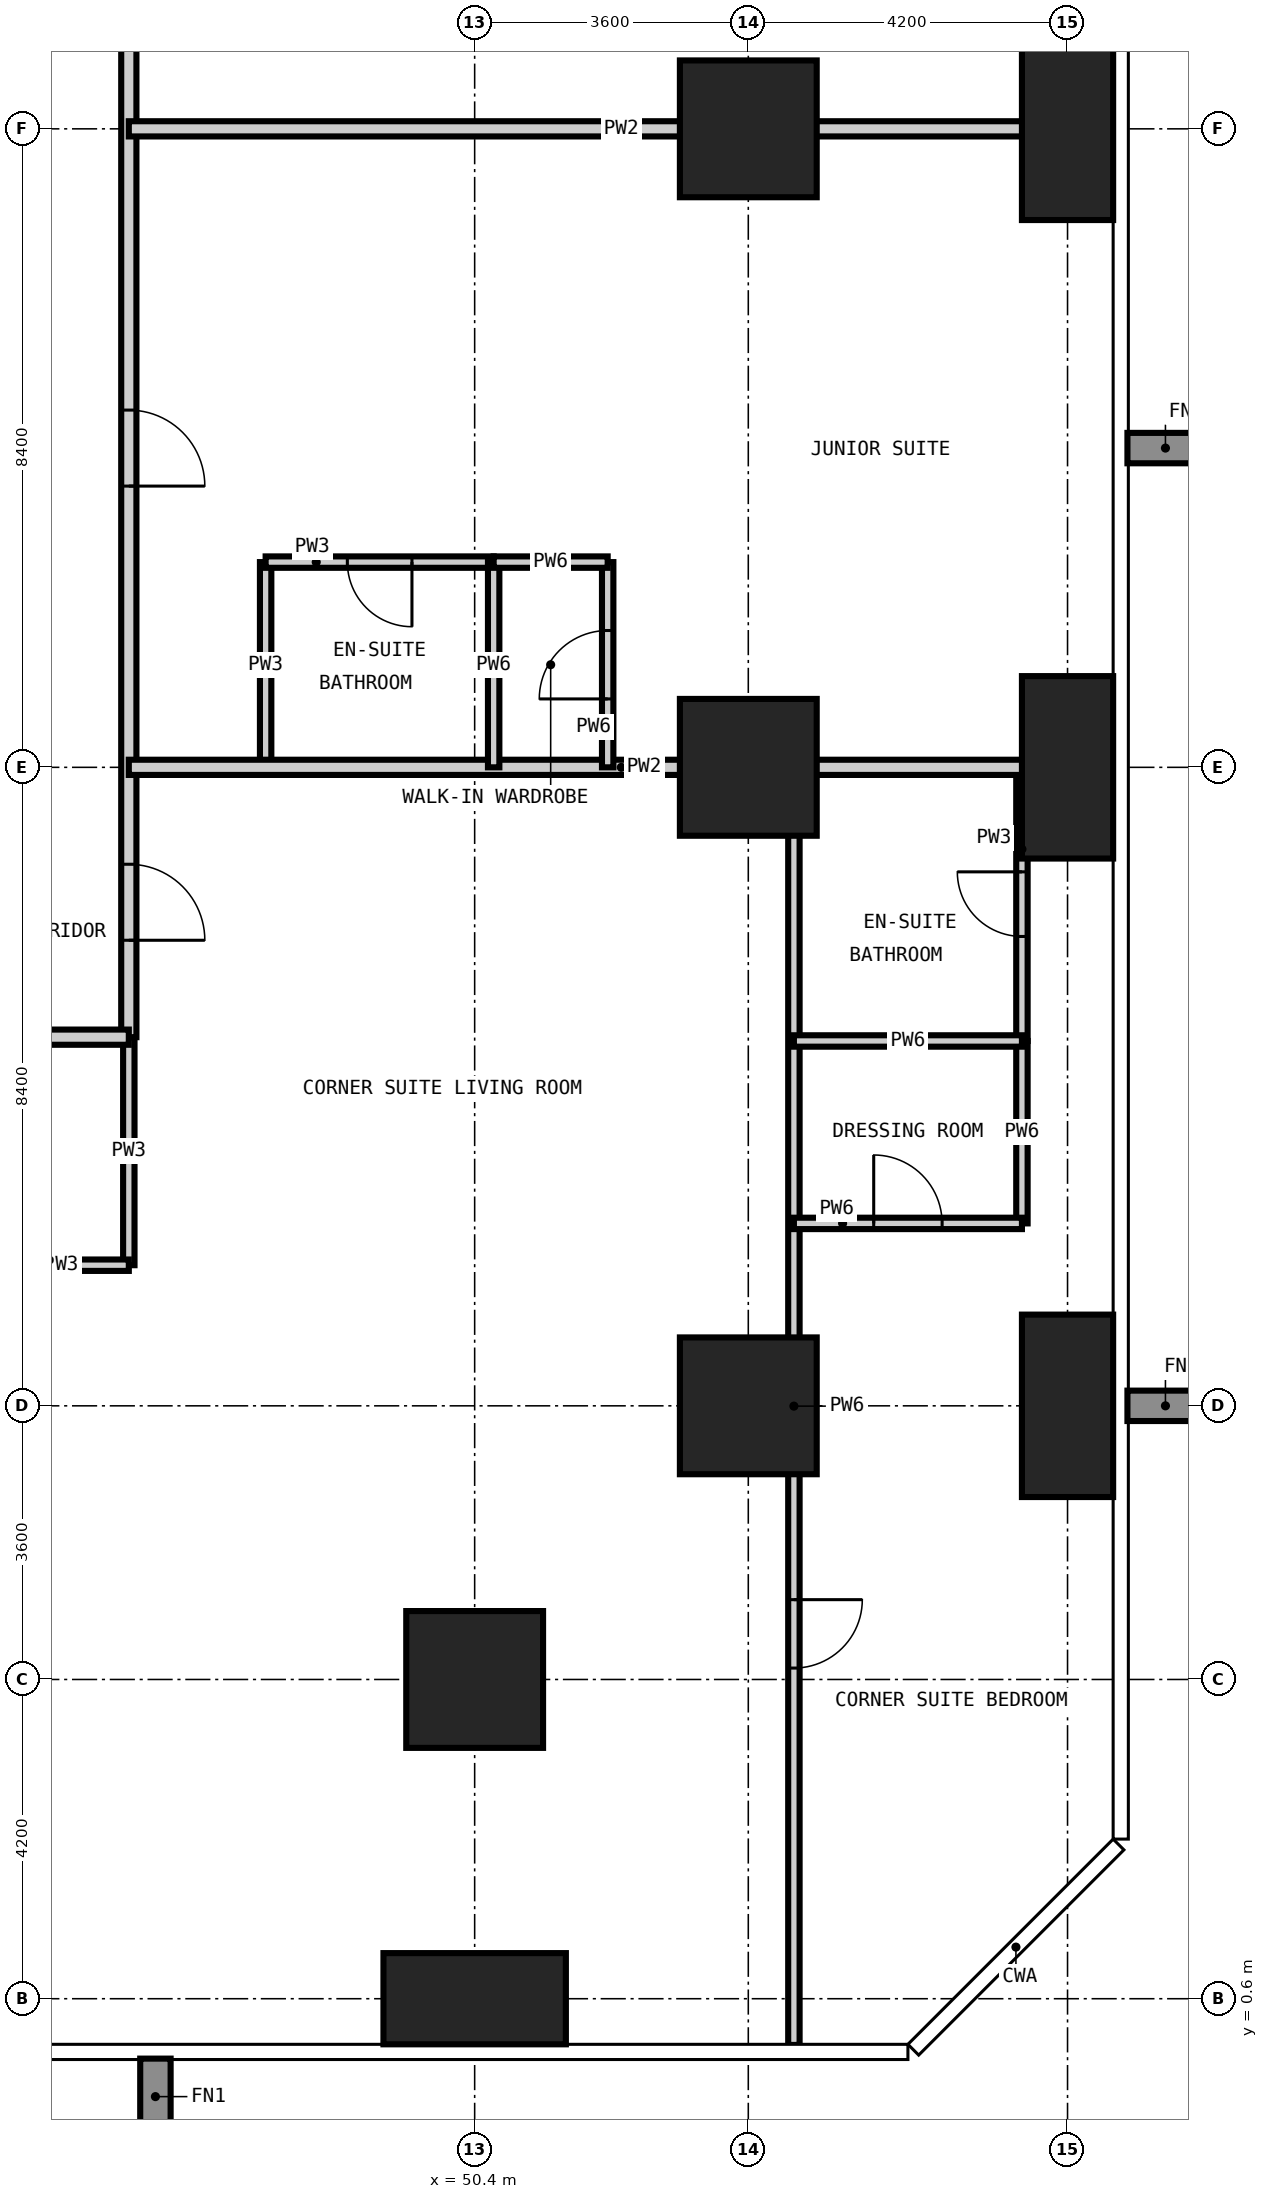
"""IFC4 building model, lengths in metres.
Left out: names, types, materials, properties, quantities, classifications, styles, units other than length and angle.
Written with IfcOpenShell. Run it as: python <this file> out.ifc"""

import sys

from ifc_helpers import new_model, si_unit, direction, frame, frame_2d, origin, origin_2d, place, context, subcontext, project, spatial, rectangle, extrude, element, fill, save


model = new_model("IFC4")
c1 = context("Model", 3, precision=1e-05, world=origin(), true_north=direction((0.0, 1.0)))
c2 = subcontext(c1, "Body", "Model", "MODEL_VIEW")
j1 = project(units=[si_unit("LENGTHUNIT", "METRE"), si_unit("PLANEANGLEUNIT", "RADIAN")], contexts=[c1])
p1 = place(None, origin())
s1 = spatial("IfcSite", under=j1, at=p1, CompositionType="ELEMENT")
p2 = place(p1, origin())
s2 = spatial("IfcBuilding", under=s1, at=p2, CompositionType="ELEMENT")
p3 = place(p2, frame((0.0, 0.0, 34.2)))
s3 = spatial("IfcBuildingStorey", under=s2, at=p3, CompositionType="ELEMENT", Elevation=34.2)
p4 = place(p3, frame((50.4, 0.6, -0.35), z_axis=(0.0, 0.0, 1.0), x_axis=(1.0, 0.0, 0.0)))
e1 = element("IfcColumn", 1, at=p4, inside=s3, PredefinedType="COLUMN", context=c2, shape_type="SweptSolid", body=[
    extrude(rectangle(XDim=2.4, YDim=1.2, at=origin_2d()), origin(), (0.0, 0.0, 1.0), 3.6),
])
for number, where, z_axis, x_axis in (
    (2, (50.4, 4.8, -0.35), (0.0, 0.0, 1.0), (1.0, 0.0, 0.0)),
    (3, (54.0, 8.4, -0.35), (0.0, 0.0, 1.0), (1.0, 0.0, 0.0)),
    (4, (54.0, 16.8, -0.35), (0.0, 0.0, 1.0), (1.0, 0.0, 0.0)),
    (5, (54.0, 25.2, -0.35), (0.0, 0.0, 1.0), (1.0, 0.0, 0.0)),
):
    element("IfcColumn", number, at=place(p3, frame(where, z_axis=z_axis, x_axis=x_axis)), inside=s3, PredefinedType="COLUMN", context=c2, shape_type="SweptSolid", body=[
        extrude(rectangle(XDim=1.8, YDim=1.8, at=origin_2d()), origin(), (0.0, 0.0, 1.0), 3.6),
    ])
for number, where, z_axis, x_axis in (
    (6, (58.2, 8.4, -0.35), (0.0, 0.0, 1.0), (1.0, 0.0, 0.0)),
    (7, (58.2, 16.8, -0.35), (0.0, 0.0, 1.0), (1.0, 0.0, 0.0)),
    (8, (58.2, 25.2, -0.35), (0.0, 0.0, 1.0), (1.0, 0.0, 0.0)),
):
    element("IfcColumn", number, at=place(p3, frame(where, z_axis=z_axis, x_axis=x_axis)), inside=s3, PredefinedType="COLUMN", context=c2, shape_type="SweptSolid", body=[
        extrude(rectangle(XDim=1.2, YDim=2.4, at=origin_2d()), origin(), (0.0, 0.0, 1.0), 3.6),
    ])
p5 = place(p3, frame((45.85, 10.25, 0.0), z_axis=(0.0, 0.0, 1.0), x_axis=(0.0, 1.0, 0.0)))
e9 = element("IfcWall", 9, at=p5, inside=s3, PredefinedType="PARTITIONING", context=c2, shape_type="SweptSolid", body=[
    extrude(rectangle(XDim=3.0, YDim=0.15, at=frame_2d((1.5, 0.0))), origin(), (0.0, 0.0, 1.0), 3.25),
])
p6 = place(p3, frame((47.65, 16.8, 0.0), z_axis=(0.0, 0.0, 1.0), x_axis=(0.0, 1.0, 0.0)))
e10 = element("IfcWall", 10, at=p6, inside=s3, PredefinedType="PARTITIONING", context=c2, shape_type="SweptSolid", body=[
    extrude(rectangle(XDim=2.7, YDim=0.15, at=frame_2d((1.35, 0.0))), origin(), (0.0, 0.0, 1.0), 3.25),
])
p7 = place(p3, frame((57.6, 13.2, 0.0), z_axis=(0.0, 0.0, 1.0), x_axis=(0.0, 1.0, 0.0)))
e11 = element("IfcWall", 11, at=p7, inside=s3, PredefinedType="PARTITIONING", context=c2, shape_type="SweptSolid", body=[
    extrude(rectangle(XDim=3.6, YDim=0.15, at=frame_2d((1.8, 0.0))), origin(), (0.0, 0.0, 1.0), 3.25),
])
p8 = place(p7, frame((1.375, 0.0, 0.0)))
e12 = element("IfcOpeningElement", 12, at=p8, cuts=e11, PredefinedType="OPENING", context=c2, shape_type="SweptSolid", body=[
    extrude(rectangle(XDim=0.85, YDim=2.1, at=frame_2d((0.425, 1.05))), frame((0.0, 0.085, 0.0), z_axis=(0.0, -1.0, 0.0), x_axis=(1.0, 0.0, 0.0)), (0.0, 0.0, 1.0), 0.17),
])
p9 = place(p3, frame((42.0, 10.25, 0.0), z_axis=(0.0, 0.0, 1.0), x_axis=(1.0, 0.0, 0.0)))
e13 = element("IfcWall", 13, at=p9, inside=s3, PredefinedType="PARTITIONING", context=c2, shape_type="SweptSolid", body=[
    extrude(rectangle(XDim=3.85, YDim=0.15, at=frame_2d((1.925, 0.0))), origin(), (0.0, 0.0, 1.0), 3.25),
])
p10 = place(p9, frame((1.5, 0.0, 0.0)))
e14 = element("IfcOpeningElement", 14, at=p10, cuts=e13, PredefinedType="OPENING", context=c2, shape_type="SweptSolid", body=[
    extrude(rectangle(XDim=0.85, YDim=2.1, at=frame_2d((0.425, 1.05))), frame((0.0, 0.085, 0.0), z_axis=(0.0, -1.0, 0.0), x_axis=(1.0, 0.0, 0.0)), (0.0, 0.0, 1.0), 0.17),
])
p11 = place(p3, frame((47.65, 19.5, 0.0), z_axis=(0.0, 0.0, 1.0), x_axis=(1.0, 0.0, 0.0)))
e15 = element("IfcWall", 15, at=p11, inside=s3, PredefinedType="PARTITIONING", context=c2, shape_type="SweptSolid", body=[
    extrude(rectangle(XDim=3.0, YDim=0.15, at=frame_2d((1.5, 0.0))), origin(), (0.0, 0.0, 1.0), 3.25),
])
p12 = place(p11, frame((1.075, 0.0, 0.0)))
e16 = element("IfcOpeningElement", 16, at=p12, cuts=e15, PredefinedType="OPENING", context=c2, shape_type="SweptSolid", body=[
    extrude(rectangle(XDim=0.85, YDim=2.1, at=frame_2d((0.425, 1.05))), frame((0.0, 0.085, 0.0), z_axis=(0.0, -1.0, 0.0), x_axis=(1.0, 0.0, 0.0)), (0.0, 0.0, 1.0), 0.17),
])
p13 = place(p3, frame((45.85, 45.25, 0.0), z_axis=(0.0, 0.0, 1.0), x_axis=(0.0, -1.0, 0.0)))
e17 = element("IfcWall", 17, at=p13, inside=s3, PredefinedType="PARTITIONING", context=c2, shape_type="SweptSolid", body=[
    extrude(rectangle(XDim=32.0, YDim=0.2, at=frame_2d((16.0, 0.0))), origin(), (0.0, 0.0, 1.0), 3.25),
])
p14 = place(p13, frame((23.75, 0.0, 0.0)))
e18 = element("IfcOpeningElement", 18, at=p14, cuts=e17, PredefinedType="OPENING", context=c2, shape_type="SweptSolid", body=[
    extrude(rectangle(XDim=1.0, YDim=2.2, at=frame_2d((0.5, 1.1))), frame((0.0, 0.11, 0.0), z_axis=(0.0, -1.0, 0.0), x_axis=(1.0, 0.0, 0.0)), (0.0, 0.0, 1.0), 0.22),
])
p15 = place(p13, frame((15.35, 0.0, 0.0)))
e19 = element("IfcOpeningElement", 19, at=p15, cuts=e17, PredefinedType="OPENING", context=c2, shape_type="SweptSolid", body=[
    extrude(rectangle(XDim=1.0, YDim=2.2, at=frame_2d((0.5, 1.1))), frame((0.0, 0.11, 0.0), z_axis=(0.0, -1.0, 0.0), x_axis=(1.0, 0.0, 0.0)), (0.0, 0.0, 1.0), 0.22),
])
p16 = place(p13, frame((6.95, 0.0, 0.0)))
e20 = element("IfcOpeningElement", 20, at=p16, cuts=e17, PredefinedType="OPENING", context=c2, shape_type="SweptSolid", body=[
    extrude(rectangle(XDim=1.0, YDim=2.2, at=frame_2d((0.5, 1.1))), frame((0.0, 0.11, 0.0), z_axis=(0.0, -1.0, 0.0), x_axis=(1.0, 0.0, 0.0)), (0.0, 0.0, 1.0), 0.22),
])
p17 = place(p13, frame((29.725, 0.0, 0.0)))
e21 = element("IfcOpeningElement", 21, at=p17, cuts=e17, PredefinedType="OPENING", context=c2, shape_type="SweptSolid", body=[
    extrude(rectangle(XDim=1.0, YDim=2.2, at=frame_2d((0.5, 1.1))), frame((0.0, 0.11, 0.0), z_axis=(0.0, -1.0, 0.0), x_axis=(1.0, 0.0, 0.0)), (0.0, 0.0, 1.0), 0.22),
])
p18 = place(p13, frame((1.125, 0.0, 0.0)))
e22 = element("IfcOpeningElement", 22, at=p18, cuts=e17, PredefinedType="OPENING", context=c2, shape_type="SweptSolid", body=[
    extrude(rectangle(XDim=1.0, YDim=2.2, at=frame_2d((0.5, 1.1))), frame((0.0, 0.11, 0.0), z_axis=(0.0, -1.0, 0.0), x_axis=(1.0, 0.0, 0.0)), (0.0, 0.0, 1.0), 0.22),
])
p19 = place(p3, frame((45.85, 13.25, 0.0), z_axis=(0.0, 0.0, 1.0), x_axis=(-1.0, 0.0, 0.0)))
e23 = element("IfcWall", 23, at=p19, inside=s3, PredefinedType="PARTITIONING", context=c2, shape_type="SweptSolid", body=[
    extrude(rectangle(XDim=32.6, YDim=0.2, at=frame_2d((16.3, 0.0))), origin(), (0.0, 0.0, 1.0), 3.25),
])
p20 = place(p19, frame((25.1, 0.0, 0.0)))
e24 = element("IfcOpeningElement", 24, at=p20, cuts=e23, PredefinedType="OPENING", context=c2, shape_type="SweptSolid", body=[
    extrude(rectangle(XDim=1.0, YDim=2.2, at=frame_2d((0.5, 1.1))), frame((0.0, 0.11, 0.0), z_axis=(0.0, -1.0, 0.0), x_axis=(1.0, 0.0, 0.0)), (0.0, 0.0, 1.0), 0.22),
])
p21 = place(p19, frame((21.65, 0.0, 0.0)))
e25 = element("IfcOpeningElement", 25, at=p21, cuts=e23, PredefinedType="OPENING", context=c2, shape_type="SweptSolid", body=[
    extrude(rectangle(XDim=1.0, YDim=2.2, at=frame_2d((0.5, 1.1))), frame((0.0, 0.11, 0.0), z_axis=(0.0, -1.0, 0.0), x_axis=(1.0, 0.0, 0.0)), (0.0, 0.0, 1.0), 0.22),
])
p22 = place(p19, frame((11.75, 0.0, 0.0)))
e26 = element("IfcOpeningElement", 26, at=p22, cuts=e23, PredefinedType="OPENING", context=c2, shape_type="SweptSolid", body=[
    extrude(rectangle(XDim=1.0, YDim=2.2, at=frame_2d((0.5, 1.1))), frame((0.0, 0.11, 0.0), z_axis=(0.0, -1.0, 0.0), x_axis=(1.0, 0.0, 0.0)), (0.0, 0.0, 1.0), 0.22),
])
p23 = place(p19, frame((6.8, 0.0, 0.0)))
e27 = element("IfcOpeningElement", 27, at=p23, cuts=e23, PredefinedType="OPENING", context=c2, shape_type="SweptSolid", body=[
    extrude(rectangle(XDim=1.0, YDim=2.2, at=frame_2d((0.5, 1.1))), frame((0.0, 0.11, 0.0), z_axis=(0.0, -1.0, 0.0), x_axis=(1.0, 0.0, 0.0)), (0.0, 0.0, 1.0), 0.22),
])
for number, where, z_axis, x_axis in (
    (28, (45.85, 16.8, 0.0), (0.0, 0.0, 1.0), (1.0, 0.0, 0.0)),
    (29, (45.85, 25.2, 0.0), (0.0, 0.0, 1.0), (1.0, 0.0, 0.0)),
):
    element("IfcWall", number, at=place(p3, frame(where, z_axis=z_axis, x_axis=x_axis)), inside=s3, PredefinedType="PARTITIONING", context=c2, shape_type="SweptSolid", body=[
        extrude(rectangle(XDim=12.958, YDim=0.2, at=frame_2d((6.479, 0.0))), origin(), (0.0, 0.0, 1.0), 3.25),
    ])
p24 = place(p3, frame((50.65, 16.8, 0.0), z_axis=(0.0, 0.0, 1.0), x_axis=(0.0, 1.0, 0.0)))
e30 = element("IfcWall", 30, at=p24, inside=s3, PredefinedType="PARTITIONING", context=c2, shape_type="SweptSolid", body=[
    extrude(rectangle(XDim=2.7, YDim=0.15, at=frame_2d((1.35, 0.0))), origin(), (0.0, 0.0, 1.0), 3.25),
])
p25 = place(p3, frame((52.15, 16.8, 0.0), z_axis=(0.0, 0.0, 1.0), x_axis=(0.0, 1.0, 0.0)))
e31 = element("IfcWall", 31, at=p25, inside=s3, PredefinedType="PARTITIONING", context=c2, shape_type="SweptSolid", body=[
    extrude(rectangle(XDim=2.7, YDim=0.15, at=frame_2d((1.35, 0.0))), origin(), (0.0, 0.0, 1.0), 3.25),
])
p26 = place(p25, frame((0.9, 0.0, 0.0)))
e32 = element("IfcOpeningElement", 32, at=p26, cuts=e31, PredefinedType="OPENING", context=c2, shape_type="SweptSolid", body=[
    extrude(rectangle(XDim=0.9, YDim=2.1, at=frame_2d((0.45, 1.05))), frame((0.0, 0.085, 0.0), z_axis=(0.0, -1.0, 0.0), x_axis=(1.0, 0.0, 0.0)), (0.0, 0.0, 1.0), 0.17),
])
p27 = place(p3, frame((54.6, -0.008, 0.0), z_axis=(0.0, 0.0, 1.0), x_axis=(0.0, 1.0, 0.0)))
e33 = element("IfcWall", 33, at=p27, inside=s3, PredefinedType="PARTITIONING", context=c2, shape_type="SweptSolid", body=[
    extrude(rectangle(XDim=16.808, YDim=0.15, at=frame_2d((8.404, 0.0))), origin(), (0.0, 0.0, 1.0), 3.25),
])
p28 = place(p27, frame((4.958, 0.0, 0.0)))
e34 = element("IfcOpeningElement", 34, at=p28, cuts=e33, PredefinedType="OPENING", context=c2, shape_type="SweptSolid", body=[
    extrude(rectangle(XDim=0.9, YDim=2.1, at=frame_2d((0.45, 1.05))), frame((0.0, 0.085, 0.0), z_axis=(0.0, -1.0, 0.0), x_axis=(1.0, 0.0, 0.0)), (0.0, 0.0, 1.0), 0.17),
])
p29 = place(p3, frame((57.6, 10.8, 0.0), z_axis=(0.0, 0.0, 1.0), x_axis=(0.0, 1.0, 0.0)))
e35 = element("IfcWall", 35, at=p29, inside=s3, PredefinedType="PARTITIONING", context=c2, shape_type="SweptSolid", body=[
    extrude(rectangle(XDim=2.4, YDim=0.15, at=frame_2d((1.2, 0.0))), origin(), (0.0, 0.0, 1.0), 3.25),
])
p30 = place(p3, frame((54.6, 10.8, 0.0), z_axis=(0.0, 0.0, 1.0), x_axis=(1.0, 0.0, 0.0)))
e36 = element("IfcWall", 36, at=p30, inside=s3, PredefinedType="PARTITIONING", context=c2, shape_type="SweptSolid", body=[
    extrude(rectangle(XDim=3.0, YDim=0.15, at=frame_2d((1.5, 0.0))), origin(), (0.0, 0.0, 1.0), 3.25),
])
p31 = place(p30, frame((1.05, 0.0, 0.0)))
e37 = element("IfcOpeningElement", 37, at=p31, cuts=e36, PredefinedType="OPENING", context=c2, shape_type="SweptSolid", body=[
    extrude(rectangle(XDim=0.9, YDim=2.1, at=frame_2d((0.45, 1.05))), frame((0.0, 0.085, 0.0), z_axis=(0.0, -1.0, 0.0), x_axis=(1.0, 0.0, 0.0)), (0.0, 0.0, 1.0), 0.17),
])
p32 = place(p3, frame((54.6, 13.2, 0.0), z_axis=(0.0, 0.0, 1.0), x_axis=(1.0, 0.0, 0.0)))
e38 = element("IfcWall", 38, at=p32, inside=s3, PredefinedType="PARTITIONING", context=c2, shape_type="SweptSolid", body=[
    extrude(rectangle(XDim=3.0, YDim=0.15, at=frame_2d((1.5, 0.0))), origin(), (0.0, 0.0, 1.0), 3.25),
])
p33 = place(p3, frame((50.65, 19.5, 0.0), z_axis=(0.0, 0.0, 1.0), x_axis=(1.0, 0.0, 0.0)))
e39 = element("IfcWall", 39, at=p33, inside=s3, PredefinedType="PARTITIONING", context=c2, shape_type="SweptSolid", body=[
    extrude(rectangle(XDim=1.5, YDim=0.15, at=frame_2d((0.75, 0.0))), origin(), (0.0, 0.0, 1.0), 3.25),
])
p34 = place(p14, origin())
e40 = element("IfcDoor", 40, at=p34, inside=s3, OperationType="SINGLE_SWING_RIGHT", PredefinedType="DOOR", context=c2, shape_type="SweptSolid", body=[
    extrude(rectangle(XDim=1.0, YDim=2.2, at=frame_2d((0.5, 1.1))), frame((0.0, 0.025, 0.0), z_axis=(0.0, -1.0, 0.0), x_axis=(1.0, 0.0, 0.0)), (0.0, 0.0, 1.0), 0.05),
])
fill(e18, e40)
p35 = place(p12, frame((0.85, 0.0, 0.0), z_axis=(0.0, 0.0, 1.0), x_axis=(-1.0, 0.0, 0.0)))
e41 = element("IfcDoor", 41, at=p35, inside=s3, OperationType="SINGLE_SWING_LEFT", PredefinedType="DOOR", context=c2, shape_type="SweptSolid", body=[
    extrude(rectangle(XDim=0.85, YDim=2.1, at=frame_2d((0.425, 1.05))), frame((0.0, 0.025, 0.0), z_axis=(0.0, -1.0, 0.0), x_axis=(1.0, 0.0, 0.0)), (0.0, 0.0, 1.0), 0.05),
])
fill(e16, e41)
p36 = place(p26, origin())
e42 = element("IfcDoor", 42, at=p36, inside=s3, OperationType="SINGLE_SWING_LEFT", PredefinedType="DOOR", context=c2, shape_type="SweptSolid", body=[
    extrude(rectangle(XDim=0.9, YDim=2.1, at=frame_2d((0.45, 1.05))), frame((0.0, 0.025, 0.0), z_axis=(0.0, -1.0, 0.0), x_axis=(1.0, 0.0, 0.0)), (0.0, 0.0, 1.0), 0.05),
])
fill(e32, e42)
p37 = place(p17, origin())
e43 = element("IfcDoor", 43, at=p37, inside=s3, OperationType="SINGLE_SWING_RIGHT", PredefinedType="DOOR", context=c2, shape_type="SweptSolid", body=[
    extrude(rectangle(XDim=1.0, YDim=2.2, at=frame_2d((0.5, 1.1))), frame((0.0, 0.025, 0.0), z_axis=(0.0, -1.0, 0.0), x_axis=(1.0, 0.0, 0.0)), (0.0, 0.0, 1.0), 0.05),
])
fill(e21, e43)
p38 = place(p28, frame((0.9, 0.0, 0.0), z_axis=(0.0, 0.0, 1.0), x_axis=(-1.0, 0.0, 0.0)))
e44 = element("IfcDoor", 44, at=p38, inside=s3, OperationType="SINGLE_SWING_LEFT", PredefinedType="DOOR", context=c2, shape_type="SweptSolid", body=[
    extrude(rectangle(XDim=0.9, YDim=2.1, at=frame_2d((0.45, 1.05))), frame((0.0, 0.025, 0.0), z_axis=(0.0, -1.0, 0.0), x_axis=(1.0, 0.0, 0.0)), (0.0, 0.0, 1.0), 0.05),
])
fill(e34, e44)
p39 = place(p8, origin())
e45 = element("IfcDoor", 45, at=p39, inside=s3, OperationType="SINGLE_SWING_RIGHT", PredefinedType="DOOR", context=c2, shape_type="SweptSolid", body=[
    extrude(rectangle(XDim=0.85, YDim=2.1, at=frame_2d((0.425, 1.05))), frame((0.0, 0.025, 0.0), z_axis=(0.0, -1.0, 0.0), x_axis=(1.0, 0.0, 0.0)), (0.0, 0.0, 1.0), 0.05),
])
fill(e12, e45)
p40 = place(p31, origin())
e46 = element("IfcDoor", 46, at=p40, inside=s3, OperationType="SINGLE_SWING_LEFT", PredefinedType="DOOR", context=c2, shape_type="SweptSolid", body=[
    extrude(rectangle(XDim=0.9, YDim=2.1, at=frame_2d((0.45, 1.05))), frame((0.0, 0.025, 0.0), z_axis=(0.0, -1.0, 0.0), x_axis=(1.0, 0.0, 0.0)), (0.0, 0.0, 1.0), 0.05),
])
fill(e37, e46)
save(model, sys.argv[1])
